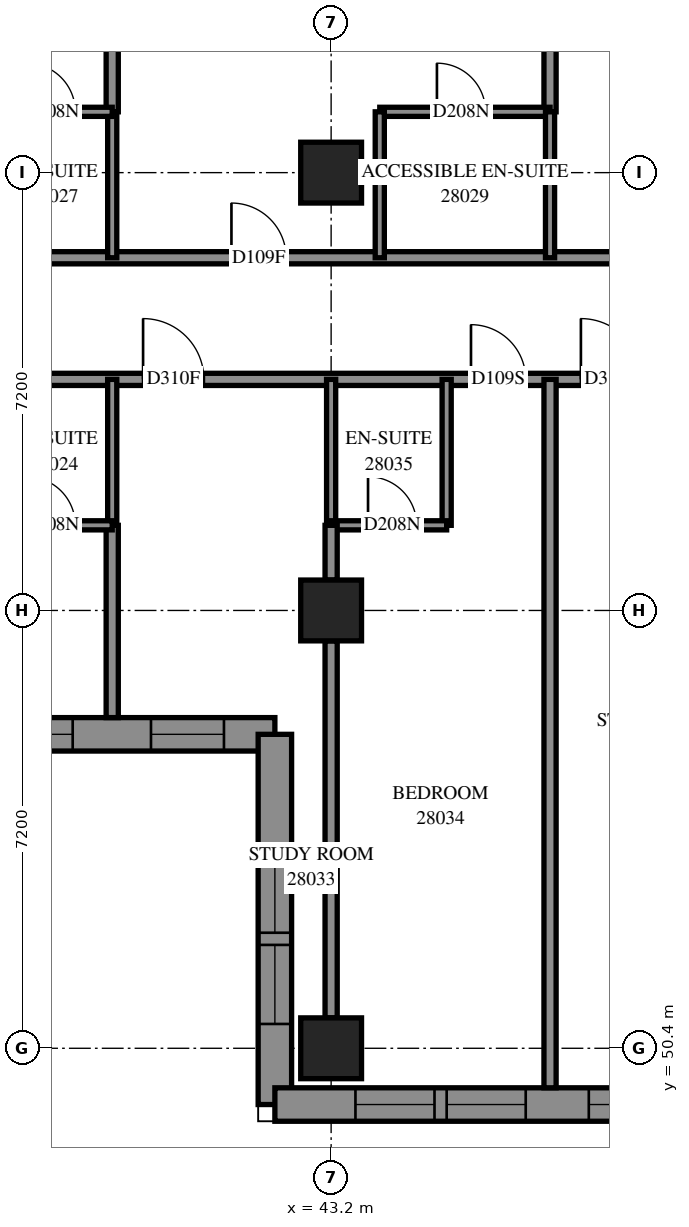
"""IFC4 building model, lengths in metres.
Left out: names, types, materials, properties, quantities, classifications, styles, units other than length and angle.
Written with IfcOpenShell. Run it as: python <this file> out.ifc"""

import sys

from ifc_helpers import new_model, si_unit, direction, frame, frame_2d, origin, origin_2d, place, context, subcontext, project, spatial, polyline, rectangle, outline, extrude, element, fill, save


model = new_model("IFC4")
c1 = context("Model", 3, precision=1e-05, world=origin(), true_north=direction((0.0, 1.0)))
c2 = subcontext(c1, "Body", "Model", "MODEL_VIEW")
j1 = project(units=[si_unit("LENGTHUNIT", "METRE"), si_unit("PLANEANGLEUNIT", "RADIAN")], contexts=[c1])
p1 = place(None, origin())
s1 = spatial("IfcSite", under=j1, at=p1, CompositionType="ELEMENT")
p2 = place(p1, origin())
s2 = spatial("IfcBuilding", under=s1, at=p2, CompositionType="ELEMENT")
p3 = place(p2, frame((0.0, 0.0, 105.0)))
s3 = spatial("IfcBuildingStorey", under=s2, at=p3, CompositionType="ELEMENT", Elevation=105.0)
for number, where, z_axis, x_axis in (
    (1, (43.2, 50.4, 0.0), (0.0, 0.0, 1.0), (1.0, 0.0, 0.0)),
    (2, (43.2, 57.6, 0.0), (0.0, 0.0, 1.0), (1.0, 0.0, 0.0)),
    (3, (43.2, 64.8, 0.0), (0.0, 0.0, 1.0), (1.0, 0.0, 0.0)),
):
    element("IfcColumn", number, at=place(p3, frame(where, z_axis=z_axis, x_axis=x_axis)), inside=s3, PredefinedType="COLUMN", context=c2, shape_type="SweptSolid", body=[
        extrude(rectangle(XDim=1.0, YDim=1.0, at=origin_2d()), origin(), (0.0, 0.0, 1.0), 3.1),
    ])
p4 = place(p3, frame((27.875, 55.563, 0.0), z_axis=(0.0, 0.0, 1.0), x_axis=(1.0, 0.0, 0.0)))
e4 = element("IfcWall", 4, at=p4, inside=s3, PredefinedType="SOLIDWALL", context=c2, shape_type="SweptSolid", body=[
    extrude(outline(polyline([(-0.275, -0.275), (14.125, -0.275), (14.675, 0.275), (0.275, 0.275), (-0.275, -0.275)])), origin(), (0.0, 0.0, 1.0), 3.1),
])
p5 = place(p4, frame((1.175, 0.0, 0.5)))
e5 = element("IfcOpeningElement", 5, at=p5, cuts=e4, PredefinedType="OPENING", context=c2, shape_type="SweptSolid", body=[
    extrude(rectangle(XDim=1.3, YDim=2.45, at=frame_2d((0.65, 1.225))), frame((0.0, 0.285, 0.0), z_axis=(0.0, -1.0, 0.0), x_axis=(1.0, 0.0, 0.0)), (0.0, 0.0, 1.0), 0.57),
])
p6 = place(p4, frame((2.675, 0.0, 0.5)))
e6 = element("IfcOpeningElement", 6, at=p6, cuts=e4, PredefinedType="OPENING", context=c2, shape_type="SweptSolid", body=[
    extrude(rectangle(XDim=1.3, YDim=2.45, at=frame_2d((0.65, 1.225))), frame((0.0, 0.285, 0.0), z_axis=(0.0, -1.0, 0.0), x_axis=(1.0, 0.0, 0.0)), (0.0, 0.0, 1.0), 0.57),
])
p7 = place(p4, frame((4.925, 0.0, 0.5)))
e7 = element("IfcOpeningElement", 7, at=p7, cuts=e4, PredefinedType="OPENING", context=c2, shape_type="SweptSolid", body=[
    extrude(rectangle(XDim=1.3, YDim=2.45, at=frame_2d((0.65, 1.225))), frame((0.0, 0.285, 0.0), z_axis=(0.0, -1.0, 0.0), x_axis=(1.0, 0.0, 0.0)), (0.0, 0.0, 1.0), 0.57),
])
p8 = place(p4, frame((6.425, 0.0, 0.5)))
e8 = element("IfcOpeningElement", 8, at=p8, cuts=e4, PredefinedType="OPENING", context=c2, shape_type="SweptSolid", body=[
    extrude(rectangle(XDim=1.3, YDim=2.45, at=frame_2d((0.65, 1.225))), frame((0.0, 0.285, 0.0), z_axis=(0.0, -1.0, 0.0), x_axis=(1.0, 0.0, 0.0)), (0.0, 0.0, 1.0), 0.57),
])
p9 = place(p4, frame((8.275, 0.0, 0.5)))
e9 = element("IfcOpeningElement", 9, at=p9, cuts=e4, PredefinedType="OPENING", context=c2, shape_type="SweptSolid", body=[
    extrude(rectangle(XDim=1.3, YDim=2.45, at=frame_2d((0.65, 1.225))), frame((0.0, 0.285, 0.0), z_axis=(0.0, -1.0, 0.0), x_axis=(1.0, 0.0, 0.0)), (0.0, 0.0, 1.0), 0.57),
])
p10 = place(p4, frame((9.775, 0.0, 0.5)))
e10 = element("IfcOpeningElement", 10, at=p10, cuts=e4, PredefinedType="OPENING", context=c2, shape_type="SweptSolid", body=[
    extrude(rectangle(XDim=1.3, YDim=2.45, at=frame_2d((0.65, 1.225))), frame((0.0, 0.285, 0.0), z_axis=(0.0, -1.0, 0.0), x_axis=(1.0, 0.0, 0.0)), (0.0, 0.0, 1.0), 0.57),
])
p11 = place(p4, frame((12.363, 0.0, 0.5)))
e11 = element("IfcOpeningElement", 11, at=p11, cuts=e4, PredefinedType="OPENING", context=c2, shape_type="SweptSolid", body=[
    extrude(rectangle(XDim=1.2, YDim=2.45, at=frame_2d((0.6, 1.225))), frame((0.0, 0.285, 0.0), z_axis=(0.0, -1.0, 0.0), x_axis=(1.0, 0.0, 0.0)), (0.0, 0.0, 1.0), 0.57),
])
p12 = place(p3, frame((42.275, 55.563, 0.0), z_axis=(0.0, 0.0, 1.0), x_axis=(0.0, -1.0, 0.0)))
e12 = element("IfcWall", 12, at=p12, inside=s3, PredefinedType="SOLIDWALL", context=c2, shape_type="SweptSolid", body=[
    extrude(outline(polyline([(0.275, -0.275), (6.363, -0.275), (5.813, 0.275), (-0.275, 0.275), (0.275, -0.275)])), origin(), (0.0, 0.0, 1.0), 3.1),
])
p13 = place(p12, frame((1.963, 0.0, 0.5)))
e13 = element("IfcOpeningElement", 13, at=p13, cuts=e12, PredefinedType="OPENING", context=c2, shape_type="SweptSolid", body=[
    extrude(rectangle(XDim=1.3, YDim=2.45, at=frame_2d((0.65, 1.225))), frame((0.0, 0.285, 0.0), z_axis=(0.0, -1.0, 0.0), x_axis=(1.0, 0.0, 0.0)), (0.0, 0.0, 1.0), 0.57),
])
p14 = place(p12, frame((3.463, 0.0, 0.5)))
e14 = element("IfcOpeningElement", 14, at=p14, cuts=e12, PredefinedType="OPENING", context=c2, shape_type="SweptSolid", body=[
    extrude(rectangle(XDim=1.3, YDim=2.45, at=frame_2d((0.65, 1.225))), frame((0.0, 0.285, 0.0), z_axis=(0.0, -1.0, 0.0), x_axis=(1.0, 0.0, 0.0)), (0.0, 0.0, 1.0), 0.57),
])
p15 = place(p3, frame((42.275, 49.475, 0.0), z_axis=(0.0, 0.0, 1.0), x_axis=(1.0, 0.0, 0.0)))
e15 = element("IfcWall", 15, at=p15, inside=s3, PredefinedType="SOLIDWALL", context=c2, shape_type="SweptSolid", body=[
    extrude(outline(polyline([(-0.275, -0.275), (6.925, -0.275), (7.475, 0.275), (0.275, 0.275), (-0.275, -0.275)])), origin(), (0.0, 0.0, 1.0), 3.1),
])
p16 = place(p15, frame((1.325, 0.0, 0.5)))
e16 = element("IfcOpeningElement", 16, at=p16, cuts=e15, PredefinedType="OPENING", context=c2, shape_type="SweptSolid", body=[
    extrude(rectangle(XDim=1.3, YDim=2.45, at=frame_2d((0.65, 1.225))), frame((0.0, 0.285, 0.0), z_axis=(0.0, -1.0, 0.0), x_axis=(1.0, 0.0, 0.0)), (0.0, 0.0, 1.0), 0.57),
])
p17 = place(p15, frame((2.825, 0.0, 0.5)))
e17 = element("IfcOpeningElement", 17, at=p17, cuts=e15, PredefinedType="OPENING", context=c2, shape_type="SweptSolid", body=[
    extrude(rectangle(XDim=1.3, YDim=2.45, at=frame_2d((0.65, 1.225))), frame((0.0, 0.285, 0.0), z_axis=(0.0, -1.0, 0.0), x_axis=(1.0, 0.0, 0.0)), (0.0, 0.0, 1.0), 0.57),
])
p18 = place(p15, frame((5.162, 0.0, 0.5)))
e18 = element("IfcOpeningElement", 18, at=p18, cuts=e15, PredefinedType="OPENING", context=c2, shape_type="SweptSolid", body=[
    extrude(rectangle(XDim=1.2, YDim=2.45, at=frame_2d((0.6, 1.225))), frame((0.0, 0.285, 0.0), z_axis=(0.0, -1.0, 0.0), x_axis=(1.0, 0.0, 0.0)), (0.0, 0.0, 1.0), 0.57),
])
p19 = place(p3, frame((28.8, 61.4, 0.0), z_axis=(0.0, 0.0, 1.0), x_axis=(1.0, 0.0, 0.0)))
e19 = element("IfcWall", 19, at=p19, inside=s3, PredefinedType="PARTITIONING", context=c2, shape_type="SweptSolid", body=[
    extrude(rectangle(XDim=24.2, YDim=0.2, at=frame_2d((12.1, 0.0))), origin(), (0.0, 0.0, 1.0), 3.1),
])
p20 = place(p19, frame((2.3, 0.0, 0.0)))
e20 = element("IfcOpeningElement", 20, at=p20, cuts=e19, PredefinedType="OPENING", context=c2, shape_type="SweptSolid", body=[
    extrude(rectangle(XDim=0.9, YDim=2.1, at=frame_2d((0.45, 1.05))), frame((0.0, 0.11, 0.0), z_axis=(0.0, -1.0, 0.0), x_axis=(1.0, 0.0, 0.0)), (0.0, 0.0, 1.0), 0.22),
])
p21 = place(p19, frame((5.901, 0.0, 0.0)))
e21 = element("IfcOpeningElement", 21, at=p21, cuts=e19, PredefinedType="OPENING", context=c2, shape_type="SweptSolid", body=[
    extrude(rectangle(XDim=0.9, YDim=2.1, at=frame_2d((0.45, 1.05))), frame((0.0, 0.11, 0.0), z_axis=(0.0, -1.0, 0.0), x_axis=(1.0, 0.0, 0.0)), (0.0, 0.0, 1.0), 0.22),
])
p22 = place(p19, frame((11.307, 0.0, 0.0)))
e22 = element("IfcOpeningElement", 22, at=p22, cuts=e19, PredefinedType="OPENING", context=c2, shape_type="SweptSolid", body=[
    extrude(rectangle(XDim=1.0, YDim=2.1, at=frame_2d((0.5, 1.05))), frame((0.0, 0.11, 0.0), z_axis=(0.0, -1.0, 0.0), x_axis=(1.0, 0.0, 0.0)), (0.0, 0.0, 1.0), 0.22),
])
p23 = place(p19, frame((16.7, 0.0, 0.0)))
e23 = element("IfcOpeningElement", 23, at=p23, cuts=e19, PredefinedType="OPENING", context=c2, shape_type="SweptSolid", body=[
    extrude(rectangle(XDim=0.9, YDim=2.1, at=frame_2d((0.45, 1.05))), frame((0.0, 0.11, 0.0), z_axis=(0.0, -1.0, 0.0), x_axis=(1.0, 0.0, 0.0)), (0.0, 0.0, 1.0), 0.22),
])
p24 = place(p19, frame((18.508, 0.0, 0.0)))
e24 = element("IfcOpeningElement", 24, at=p24, cuts=e19, PredefinedType="OPENING", context=c2, shape_type="SweptSolid", body=[
    extrude(rectangle(XDim=1.0, YDim=2.1, at=frame_2d((0.5, 1.05))), frame((0.0, 0.11, 0.0), z_axis=(0.0, -1.0, 0.0), x_axis=(1.0, 0.0, 0.0)), (0.0, 0.0, 1.0), 0.22),
])
p25 = place(p19, frame((23.074, 0.0, 0.0)))
e25 = element("IfcOpeningElement", 25, at=p25, cuts=e19, PredefinedType="OPENING", context=c2, shape_type="SweptSolid", body=[
    extrude(rectangle(XDim=1.0, YDim=2.1, at=frame_2d((0.5, 1.05))), frame((0.0, 0.11, 0.0), z_axis=(0.0, -1.0, 0.0), x_axis=(1.0, 0.0, 0.0)), (0.0, 0.0, 1.0), 0.22),
])
p26 = place(p3, frame((33.4, 63.4, 0.0), z_axis=(0.0, 0.0, 1.0), x_axis=(1.0, 0.0, 0.0)))
e26 = element("IfcWall", 26, at=p26, inside=s3, PredefinedType="PARTITIONING", context=c2, shape_type="SweptSolid", body=[
    extrude(rectangle(XDim=21.9, YDim=0.2, at=frame_2d((10.95, 0.0))), origin(), (0.0, 0.0, 1.0), 3.1),
])
p27 = place(p26, frame((3.152, 0.0, 0.0)))
e27 = element("IfcOpeningElement", 27, at=p27, cuts=e26, PredefinedType="OPENING", context=c2, shape_type="SweptSolid", body=[
    extrude(rectangle(XDim=0.9, YDim=2.1, at=frame_2d((0.45, 1.05))), frame((0.0, 0.11, 0.0), z_axis=(0.0, -1.0, 0.0), x_axis=(1.0, 0.0, 0.0)), (0.0, 0.0, 1.0), 0.22),
])
p28 = place(p26, frame((8.161, 0.0, 0.0)))
e28 = element("IfcOpeningElement", 28, at=p28, cuts=e26, PredefinedType="OPENING", context=c2, shape_type="SweptSolid", body=[
    extrude(rectangle(XDim=0.9, YDim=2.1, at=frame_2d((0.45, 1.05))), frame((0.0, 0.11, 0.0), z_axis=(0.0, -1.0, 0.0), x_axis=(1.0, 0.0, 0.0)), (0.0, 0.0, 1.0), 0.22),
])
p29 = place(p26, frame((15.471, 0.0, 0.0)))
e29 = element("IfcOpeningElement", 29, at=p29, cuts=e26, PredefinedType="OPENING", context=c2, shape_type="SweptSolid", body=[
    extrude(rectangle(XDim=1.0, YDim=2.1, at=frame_2d((0.5, 1.05))), frame((0.0, 0.11, 0.0), z_axis=(0.0, -1.0, 0.0), x_axis=(1.0, 0.0, 0.0)), (0.0, 0.0, 1.0), 0.22),
])
p30 = place(p3, frame((46.8, 49.75, 0.0), z_axis=(0.0, 0.0, 1.0), x_axis=(0.0, 1.0, 0.0)))
e30 = element("IfcWall", 30, at=p30, inside=s3, PredefinedType="PARTITIONING", context=c2, shape_type="SweptSolid", body=[
    extrude(rectangle(XDim=11.65, YDim=0.2, at=frame_2d((5.825, 0.0))), origin(), (0.0, 0.0, 1.0), 3.1),
])
p31 = place(p3, frame((39.6, 65.8, 0.0), z_axis=(0.0, 0.0, 1.0), x_axis=(0.0, 1.0, 0.0)))
e31 = element("IfcWall", 31, at=p31, inside=s3, PredefinedType="PARTITIONING", context=c2, shape_type="SweptSolid", body=[
    extrude(rectangle(XDim=7.019, YDim=0.2, at=frame_2d((3.509, 0.0))), origin(), (0.0, 0.0, 1.0), 3.1),
])
p32 = place(p3, frame((46.8, 65.8, 0.0), z_axis=(0.0, 0.0, 1.0), x_axis=(0.0, 1.0, 0.0)))
e32 = element("IfcWall", 32, at=p32, inside=s3, PredefinedType="PARTITIONING", context=c2, shape_type="SweptSolid", body=[
    extrude(rectangle(XDim=6.964, YDim=0.2, at=frame_2d((3.482, 0.0))), origin(), (0.0, 0.0, 1.0), 3.1),
])
p33 = place(p3, frame((43.2, 50.9, 0.0), z_axis=(0.0, 0.0, 1.0), x_axis=(0.0, 1.0, 0.0)))
e33 = element("IfcWall", 33, at=p33, inside=s3, PredefinedType="PARTITIONING", context=c2, shape_type="SweptSolid", body=[
    extrude(rectangle(XDim=6.2, YDim=0.2, at=frame_2d((3.1, 0.0))), origin(), (0.0, 0.0, 1.0), 2.6),
])
p34 = place(p3, frame((39.6, 55.838, 0.0), z_axis=(0.0, 0.0, 1.0), x_axis=(0.0, 1.0, 0.0)))
e34 = element("IfcWall", 34, at=p34, inside=s3, PredefinedType="PARTITIONING", context=c2, shape_type="SweptSolid", body=[
    extrude(rectangle(XDim=3.162, YDim=0.2, at=frame_2d((1.581, 0.0))), origin(), (0.0, 0.0, 1.0), 3.1),
])
p35 = place(p3, frame((44.0, 65.8, 0.0), z_axis=(0.0, 0.0, 1.0), x_axis=(1.0, 0.0, 0.0)))
e35 = element("IfcWall", 35, at=p35, inside=s3, PredefinedType="PARTITIONING", context=c2, shape_type="SweptSolid", body=[
    extrude(rectangle(XDim=2.8, YDim=0.15, at=frame_2d((1.4, 0.0))), origin(), (0.0, 0.0, 1.0), 3.1),
])
p36 = place(p35, frame((0.94, 0.0, 0.0)))
e36 = element("IfcOpeningElement", 36, at=p36, cuts=e35, PredefinedType="OPENING", context=c2, shape_type="SweptSolid", body=[
    extrude(rectangle(XDim=0.8, YDim=2.1, at=frame_2d((0.4, 1.05))), frame((0.0, 0.085, 0.0), z_axis=(0.0, -1.0, 0.0), x_axis=(1.0, 0.0, 0.0)), (0.0, 0.0, 1.0), 0.17),
])
for number, where, z_axis, x_axis in (
    (37, (39.6, 59.0, 0.0), (0.0, 0.0, 1.0), (0.0, 1.0, 0.0)),
    (38, (39.6, 63.4, 0.0), (0.0, 0.0, 1.0), (0.0, 1.0, 0.0)),
    (39, (45.1, 59.0, 0.0), (0.0, 0.0, 1.0), (0.0, 1.0, 0.0)),
    (40, (43.2, 59.0, 0.0), (0.0, 0.0, 1.0), (0.0, 1.0, 0.0)),
    (41, (44.0, 63.4, 0.0), (0.0, 0.0, 1.0), (0.0, 1.0, 0.0)),
    (42, (46.8, 63.4, 0.0), (0.0, 0.0, 1.0), (0.0, 1.0, 0.0)),
):
    element("IfcWall", number, at=place(p3, frame(where, z_axis=z_axis, x_axis=x_axis)), inside=s3, PredefinedType="PARTITIONING", context=c2, shape_type="SweptSolid", body=[
        extrude(rectangle(XDim=2.4, YDim=0.15, at=frame_2d((1.2, 0.0))), origin(), (0.0, 0.0, 1.0), 3.1),
    ])
p37 = place(p3, frame((37.7, 59.0, 0.0), z_axis=(0.0, 0.0, 1.0), x_axis=(1.0, 0.0, 0.0)))
e43 = element("IfcWall", 43, at=p37, inside=s3, PredefinedType="PARTITIONING", context=c2, shape_type="SweptSolid", body=[
    extrude(rectangle(XDim=1.9, YDim=0.15, at=frame_2d((0.95, 0.0))), origin(), (0.0, 0.0, 1.0), 3.1),
])
p38 = place(p37, frame((0.493, 0.0, 0.0)))
e44 = element("IfcOpeningElement", 44, at=p38, cuts=e43, PredefinedType="OPENING", context=c2, shape_type="SweptSolid", body=[
    extrude(rectangle(XDim=0.8, YDim=2.1, at=frame_2d((0.4, 1.05))), frame((0.0, 0.085, 0.0), z_axis=(0.0, -1.0, 0.0), x_axis=(1.0, 0.0, 0.0)), (0.0, 0.0, 1.0), 0.17),
])
p39 = place(p3, frame((43.2, 59.0, 0.0), z_axis=(0.0, 0.0, 1.0), x_axis=(1.0, 0.0, 0.0)))
e45 = element("IfcWall", 45, at=p39, inside=s3, PredefinedType="PARTITIONING", context=c2, shape_type="SweptSolid", body=[
    extrude(rectangle(XDim=1.9, YDim=0.15, at=frame_2d((0.95, 0.0))), origin(), (0.0, 0.0, 1.0), 3.1),
])
p40 = place(p39, frame((0.607, 0.0, 0.0)))
e46 = element("IfcOpeningElement", 46, at=p40, cuts=e45, PredefinedType="OPENING", context=c2, shape_type="SweptSolid", body=[
    extrude(rectangle(XDim=0.8, YDim=2.1, at=frame_2d((0.4, 1.05))), frame((0.0, 0.085, 0.0), z_axis=(0.0, -1.0, 0.0), x_axis=(1.0, 0.0, 0.0)), (0.0, 0.0, 1.0), 0.17),
])
p41 = place(p3, frame((37.7, 65.8, 0.0), z_axis=(0.0, 0.0, 1.0), x_axis=(1.0, 0.0, 0.0)))
e47 = element("IfcWall", 47, at=p41, inside=s3, PredefinedType="PARTITIONING", context=c2, shape_type="SweptSolid", body=[
    extrude(rectangle(XDim=1.9, YDim=0.15, at=frame_2d((0.95, 0.0))), origin(), (0.0, 0.0, 1.0), 3.1),
])
p42 = place(p41, frame((0.493, 0.0, 0.0)))
e48 = element("IfcOpeningElement", 48, at=p42, cuts=e47, PredefinedType="OPENING", context=c2, shape_type="SweptSolid", body=[
    extrude(rectangle(XDim=0.8, YDim=2.1, at=frame_2d((0.4, 1.05))), frame((0.0, 0.085, 0.0), z_axis=(0.0, -1.0, 0.0), x_axis=(1.0, 0.0, 0.0)), (0.0, 0.0, 1.0), 0.17),
])
p43 = place(p3, frame((43.2, 58.1, 0.0), z_axis=(0.0, 0.0, 1.0), x_axis=(0.0, 1.0, 0.0)))
e49 = element("IfcWall", 49, at=p43, inside=s3, PredefinedType="PARTITIONING", context=c2, shape_type="SweptSolid", body=[
    extrude(rectangle(XDim=0.9, YDim=0.2, at=frame_2d((0.45, 0.0))), origin(), (0.0, 0.0, 1.0), 3.1),
])
p44 = place(p10, origin())
e50 = element("IfcWindow", 50, at=p44, inside=s3, PartitioningType="SINGLE_PANEL", PredefinedType="WINDOW", context=c2, shape_type="SweptSolid", body=[
    extrude(rectangle(XDim=1.3, YDim=2.45, at=frame_2d((0.65, 1.225))), frame((0.0, 0.155, 0.0), z_axis=(0.0, -1.0, 0.0), x_axis=(1.0, 0.0, 0.0)), (0.0, 0.0, 1.0), 0.06),
])
fill(e10, e50)
p45 = place(p11, origin())
e51 = element("IfcWindow", 51, at=p45, inside=s3, PartitioningType="SINGLE_PANEL", PredefinedType="WINDOW", context=c2, shape_type="SweptSolid", body=[
    extrude(rectangle(XDim=1.2, YDim=2.45, at=frame_2d((0.6, 1.225))), frame((0.0, 0.155, 0.0), z_axis=(0.0, -1.0, 0.0), x_axis=(1.0, 0.0, 0.0)), (0.0, 0.0, 1.0), 0.06),
])
fill(e11, e51)
p46 = place(p13, origin())
e52 = element("IfcWindow", 52, at=p46, inside=s3, PartitioningType="SINGLE_PANEL", PredefinedType="WINDOW", context=c2, shape_type="SweptSolid", body=[
    extrude(rectangle(XDim=1.3, YDim=2.45, at=frame_2d((0.65, 1.225))), frame((0.0, 0.155, 0.0), z_axis=(0.0, -1.0, 0.0), x_axis=(1.0, 0.0, 0.0)), (0.0, 0.0, 1.0), 0.06),
])
fill(e13, e52)
p47 = place(p14, origin())
e53 = element("IfcWindow", 53, at=p47, inside=s3, PartitioningType="SINGLE_PANEL", PredefinedType="WINDOW", context=c2, shape_type="SweptSolid", body=[
    extrude(rectangle(XDim=1.3, YDim=2.45, at=frame_2d((0.65, 1.225))), frame((0.0, 0.155, 0.0), z_axis=(0.0, -1.0, 0.0), x_axis=(1.0, 0.0, 0.0)), (0.0, 0.0, 1.0), 0.06),
])
fill(e14, e53)
p48 = place(p16, origin())
e54 = element("IfcWindow", 54, at=p48, inside=s3, PartitioningType="SINGLE_PANEL", PredefinedType="WINDOW", context=c2, shape_type="SweptSolid", body=[
    extrude(rectangle(XDim=1.3, YDim=2.45, at=frame_2d((0.65, 1.225))), frame((0.0, 0.155, 0.0), z_axis=(0.0, -1.0, 0.0), x_axis=(1.0, 0.0, 0.0)), (0.0, 0.0, 1.0), 0.06),
])
fill(e16, e54)
p49 = place(p17, origin())
e55 = element("IfcWindow", 55, at=p49, inside=s3, PartitioningType="SINGLE_PANEL", PredefinedType="WINDOW", context=c2, shape_type="SweptSolid", body=[
    extrude(rectangle(XDim=1.3, YDim=2.45, at=frame_2d((0.65, 1.225))), frame((0.0, 0.155, 0.0), z_axis=(0.0, -1.0, 0.0), x_axis=(1.0, 0.0, 0.0)), (0.0, 0.0, 1.0), 0.06),
])
fill(e17, e55)
p50 = place(p18, origin())
e56 = element("IfcWindow", 56, at=p50, inside=s3, PartitioningType="SINGLE_PANEL", PredefinedType="WINDOW", context=c2, shape_type="SweptSolid", body=[
    extrude(rectangle(XDim=1.2, YDim=2.45, at=frame_2d((0.6, 1.225))), frame((0.0, 0.155, 0.0), z_axis=(0.0, -1.0, 0.0), x_axis=(1.0, 0.0, 0.0)), (0.0, 0.0, 1.0), 0.06),
])
fill(e18, e56)
p51 = place(p38, origin())
e57 = element("IfcDoor", 57, at=p51, inside=s3, OperationType="SINGLE_SWING_RIGHT", PredefinedType="DOOR", context=c2, shape_type="SweptSolid", body=[
    extrude(rectangle(XDim=0.8, YDim=2.1, at=frame_2d((0.4, 1.05))), frame((0.0, 0.025, 0.0), z_axis=(0.0, -1.0, 0.0), x_axis=(1.0, 0.0, 0.0)), (0.0, 0.0, 1.0), 0.05),
])
fill(e44, e57)
p52 = place(p42, origin())
e58 = element("IfcDoor", 58, at=p52, inside=s3, OperationType="SINGLE_SWING_RIGHT", PredefinedType="DOOR", context=c2, shape_type="SweptSolid", body=[
    extrude(rectangle(XDim=0.8, YDim=2.1, at=frame_2d((0.4, 1.05))), frame((0.0, 0.025, 0.0), z_axis=(0.0, -1.0, 0.0), x_axis=(1.0, 0.0, 0.0)), (0.0, 0.0, 1.0), 0.05),
])
fill(e48, e58)
p53 = place(p28, origin())
e59 = element("IfcDoor", 59, at=p53, inside=s3, OperationType="SINGLE_SWING_LEFT", PredefinedType="DOOR", context=c2, shape_type="SweptSolid", body=[
    extrude(rectangle(XDim=0.9, YDim=2.1, at=frame_2d((0.45, 1.05))), frame((0.0, 0.025, 0.0), z_axis=(0.0, -1.0, 0.0), x_axis=(1.0, 0.0, 0.0)), (0.0, 0.0, 1.0), 0.05),
])
fill(e28, e59)
p54 = place(p36, origin())
e60 = element("IfcDoor", 60, at=p54, inside=s3, OperationType="SINGLE_SWING_RIGHT", PredefinedType="DOOR", context=c2, shape_type="SweptSolid", body=[
    extrude(rectangle(XDim=0.8, YDim=2.1, at=frame_2d((0.4, 1.05))), frame((0.0, 0.025, 0.0), z_axis=(0.0, -1.0, 0.0), x_axis=(1.0, 0.0, 0.0)), (0.0, 0.0, 1.0), 0.05),
])
fill(e36, e60)
p55 = place(p22, origin())
e61 = element("IfcDoor", 61, at=p55, inside=s3, OperationType="SINGLE_SWING_RIGHT", PredefinedType="DOOR", context=c2, shape_type="SweptSolid", body=[
    extrude(rectangle(XDim=1.0, YDim=2.1, at=frame_2d((0.5, 1.05))), frame((0.0, 0.025, 0.0), z_axis=(0.0, -1.0, 0.0), x_axis=(1.0, 0.0, 0.0)), (0.0, 0.0, 1.0), 0.05),
])
fill(e22, e61)
p56 = place(p23, origin())
e62 = element("IfcDoor", 62, at=p56, inside=s3, OperationType="SINGLE_SWING_LEFT", PredefinedType="DOOR", context=c2, shape_type="SweptSolid", body=[
    extrude(rectangle(XDim=0.9, YDim=2.1, at=frame_2d((0.45, 1.05))), frame((0.0, 0.025, 0.0), z_axis=(0.0, -1.0, 0.0), x_axis=(1.0, 0.0, 0.0)), (0.0, 0.0, 1.0), 0.05),
])
fill(e23, e62)
p57 = place(p40, origin())
e63 = element("IfcDoor", 63, at=p57, inside=s3, OperationType="SINGLE_SWING_RIGHT", PredefinedType="DOOR", context=c2, shape_type="SweptSolid", body=[
    extrude(rectangle(XDim=0.8, YDim=2.1, at=frame_2d((0.4, 1.05))), frame((0.0, 0.025, 0.0), z_axis=(0.0, -1.0, 0.0), x_axis=(1.0, 0.0, 0.0)), (0.0, 0.0, 1.0), 0.05),
])
fill(e46, e63)
p58 = place(p24, origin())
e64 = element("IfcDoor", 64, at=p58, inside=s3, OperationType="SINGLE_SWING_RIGHT", PredefinedType="DOOR", context=c2, shape_type="SweptSolid", body=[
    extrude(rectangle(XDim=1.0, YDim=2.1, at=frame_2d((0.5, 1.05))), frame((0.0, 0.025, 0.0), z_axis=(0.0, -1.0, 0.0), x_axis=(1.0, 0.0, 0.0)), (0.0, 0.0, 1.0), 0.05),
])
fill(e24, e64)
save(model, sys.argv[1])
